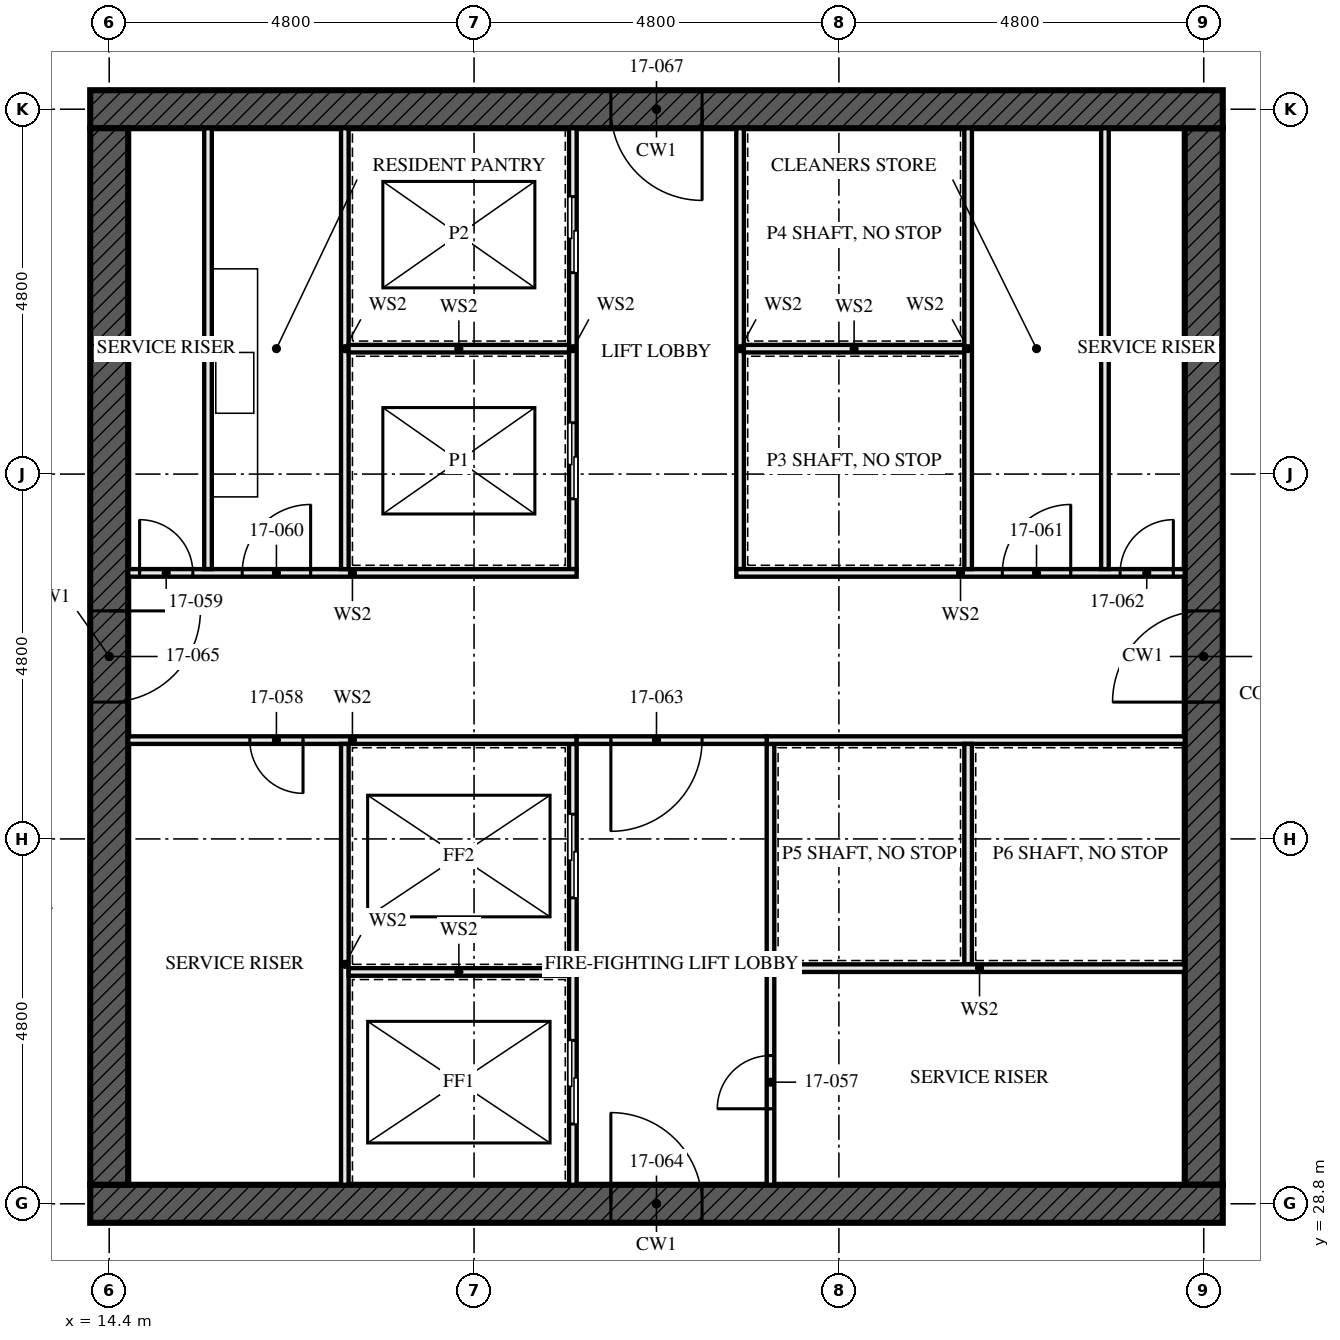
"""IFC4 building model, lengths in metres.
Left out: names, types, materials, properties, quantities, classifications, styles, units other than length and angle.
Written with IfcOpenShell. Run it as: python <this file> out.ifc"""

import sys

from ifc_helpers import new_model, si_unit, direction, frame, frame_2d, origin, place, context, subcontext, project, spatial, rectangle, extrude, element, fill, save


model = new_model("IFC4")
c1 = context("Model", 3, precision=1e-05, world=origin(), true_north=direction((0.0, 1.0)))
c2 = subcontext(c1, "Body", "Model", "MODEL_VIEW")
j1 = project(units=[si_unit("LENGTHUNIT", "METRE"), si_unit("PLANEANGLEUNIT", "RADIAN")], contexts=[c1])
p1 = place(None, origin())
s1 = spatial("IfcSite", under=j1, at=p1, CompositionType="ELEMENT")
p2 = place(p1, origin())
s2 = spatial("IfcBuilding", under=s1, at=p2, CompositionType="ELEMENT")
p3 = place(p2, frame((0.0, 0.0, 65.5)))
s3 = spatial("IfcBuildingStorey", under=s2, at=p3, CompositionType="ELEMENT", Elevation=65.5)
p4 = place(p3, frame((14.15, 28.8, -0.17), z_axis=(0.0, 0.0, 1.0), x_axis=(1.0, 0.0, 0.0)))
e1 = element("IfcWall", 1, at=p4, inside=s3, PredefinedType="SHEAR", context=c2, shape_type="SweptSolid", body=[
    extrude(rectangle(XDim=14.9, YDim=0.5, at=frame_2d((7.45, 0.0))), origin(), (0.0, 0.0, 1.0), 3.5),
])
p5 = place(p4, frame((6.85, 0.0, 0.17)))
e2 = element("IfcOpeningElement", 2, at=p5, cuts=e1, PredefinedType="OPENING", context=c2, shape_type="SweptSolid", body=[
    extrude(rectangle(XDim=1.2, YDim=2.1, at=frame_2d((0.6, 1.05))), frame((0.0, 0.26, 0.0), z_axis=(0.0, -1.0, 0.0), x_axis=(1.0, 0.0, 0.0)), (0.0, 0.0, 1.0), 0.521),
])
p6 = place(p3, frame((29.05, 43.2, -0.17), z_axis=(0.0, 0.0, 1.0), x_axis=(-1.0, 0.0, 0.0)))
e3 = element("IfcWall", 3, at=p6, inside=s3, PredefinedType="SHEAR", context=c2, shape_type="SweptSolid", body=[
    extrude(rectangle(XDim=14.9, YDim=0.5, at=frame_2d((7.45, 0.0))), origin(), (0.0, 0.0, 1.0), 3.5),
])
p7 = place(p6, frame((6.85, 0.0, 0.17)))
e4 = element("IfcOpeningElement", 4, at=p7, cuts=e3, PredefinedType="OPENING", context=c2, shape_type="SweptSolid", body=[
    extrude(rectangle(XDim=1.2, YDim=2.1, at=frame_2d((0.6, 1.05))), frame((0.0, 0.26, 0.0), z_axis=(0.0, -1.0, 0.0), x_axis=(1.0, 0.0, 0.0)), (0.0, 0.0, 1.0), 0.521),
])
p8 = place(p3, frame((14.4, 42.95, -0.17), z_axis=(0.0, 0.0, 1.0), x_axis=(0.0, -1.0, 0.0)))
e5 = element("IfcWall", 5, at=p8, inside=s3, PredefinedType="SHEAR", context=c2, shape_type="SweptSolid", body=[
    extrude(rectangle(XDim=13.9, YDim=0.5, at=frame_2d((6.95, 0.0))), origin(), (0.0, 0.0, 1.0), 3.5),
])
p9 = place(p8, frame((6.35, 0.0, 0.17)))
e6 = element("IfcOpeningElement", 6, at=p9, cuts=e5, PredefinedType="OPENING", context=c2, shape_type="SweptSolid", body=[
    extrude(rectangle(XDim=1.2, YDim=2.1, at=frame_2d((0.6, 1.05))), frame((0.0, 0.26, 0.0), z_axis=(0.0, -1.0, 0.0), x_axis=(1.0, 0.0, 0.0)), (0.0, 0.0, 1.0), 0.521),
])
p10 = place(p3, frame((28.8, 29.05, -0.17), z_axis=(0.0, 0.0, 1.0), x_axis=(0.0, 1.0, 0.0)))
e7 = element("IfcWall", 7, at=p10, inside=s3, PredefinedType="SHEAR", context=c2, shape_type="SweptSolid", body=[
    extrude(rectangle(XDim=13.9, YDim=0.5, at=frame_2d((6.95, 0.0))), origin(), (0.0, 0.0, 1.0), 3.5),
])
p11 = place(p10, frame((6.35, 0.0, 0.17)))
e8 = element("IfcOpeningElement", 8, at=p11, cuts=e7, PredefinedType="OPENING", context=c2, shape_type="SweptSolid", body=[
    extrude(rectangle(XDim=1.2, YDim=2.1, at=frame_2d((0.6, 1.05))), frame((0.0, 0.26, 0.0), z_axis=(0.0, -1.0, 0.0), x_axis=(1.0, 0.0, 0.0)), (0.0, 0.0, 1.0), 0.521),
])
for number, where, z_axis, x_axis in (
    (9, (15.7, 37.15, 0.0), (0.0, 0.0, 1.0), (0.0, 1.0, 0.0)),
    (10, (27.5, 37.15, 0.0), (0.0, 0.0, 1.0), (0.0, 1.0, 0.0)),
):
    element("IfcWall", number, at=place(p3, frame(where, z_axis=z_axis, x_axis=x_axis)), inside=s3, PredefinedType="SOLIDWALL", context=c2, shape_type="SweptSolid", body=[
        extrude(rectangle(XDim=5.8, YDim=0.1, at=frame_2d((2.9, 0.0))), origin(), (0.0, 0.0, 1.0), 3.33),
    ])
p12 = place(p3, frame((20.5, 29.05, 0.0), z_axis=(0.0, 0.0, 1.0), x_axis=(0.0, 1.0, 0.0)))
e11 = element("IfcWall", 11, at=p12, inside=s3, PredefinedType="SOLIDWALL", context=c2, shape_type="SweptSolid", body=[
    extrude(rectangle(XDim=5.8, YDim=0.1, at=frame_2d((2.9, 0.0))), origin(), (0.0, 0.0, 1.0), 3.33),
])
p13 = place(p12, frame((0.8, 0.0, 0.0)))
e12 = element("IfcOpeningElement", 12, at=p13, cuts=e11, PredefinedType="OPENING", context=c2, shape_type="SweptSolid", body=[
    extrude(rectangle(XDim=1.1, YDim=2.3, at=frame_2d((0.55, 1.15))), frame((0.0, 0.061, 0.0), z_axis=(0.0, -1.0, 0.0), x_axis=(1.0, 0.0, 0.0)), (0.0, 0.0, 1.0), 0.121),
])
p14 = place(p12, frame((3.775, 0.0, 0.0)))
e13 = element("IfcOpeningElement", 13, at=p14, cuts=e11, PredefinedType="OPENING", context=c2, shape_type="SweptSolid", body=[
    extrude(rectangle(XDim=1.1, YDim=2.3, at=frame_2d((0.55, 1.15))), frame((0.0, 0.061, 0.0), z_axis=(0.0, -1.0, 0.0), x_axis=(1.0, 0.0, 0.0)), (0.0, 0.0, 1.0), 0.121),
])
p15 = place(p3, frame((20.5, 37.15, 0.0), z_axis=(0.0, 0.0, 1.0), x_axis=(0.0, 1.0, 0.0)))
e14 = element("IfcWall", 14, at=p15, inside=s3, PredefinedType="SOLIDWALL", context=c2, shape_type="SweptSolid", body=[
    extrude(rectangle(XDim=5.8, YDim=0.1, at=frame_2d((2.9, 0.0))), origin(), (0.0, 0.0, 1.0), 3.33),
])
p16 = place(p15, frame((0.925, 0.0, 0.0)))
e15 = element("IfcOpeningElement", 15, at=p16, cuts=e14, PredefinedType="OPENING", context=c2, shape_type="SweptSolid", body=[
    extrude(rectangle(XDim=1.0, YDim=2.1, at=frame_2d((0.5, 1.05))), frame((0.0, 0.061, 0.0), z_axis=(0.0, -1.0, 0.0), x_axis=(1.0, 0.0, 0.0)), (0.0, 0.0, 1.0), 0.121),
])
p17 = place(p15, frame((3.9, 0.0, 0.0)))
e16 = element("IfcOpeningElement", 16, at=p17, cuts=e14, PredefinedType="OPENING", context=c2, shape_type="SweptSolid", body=[
    extrude(rectangle(XDim=1.0, YDim=2.1, at=frame_2d((0.5, 1.05))), frame((0.0, 0.061, 0.0), z_axis=(0.0, -1.0, 0.0), x_axis=(1.0, 0.0, 0.0)), (0.0, 0.0, 1.0), 0.121),
])
p18 = place(p3, frame((22.7, 37.15, 0.0), z_axis=(0.0, 0.0, 1.0), x_axis=(0.0, 1.0, 0.0)))
e17 = element("IfcWall", 17, at=p18, inside=s3, PredefinedType="SOLIDWALL", context=c2, shape_type="SweptSolid", body=[
    extrude(rectangle(XDim=5.8, YDim=0.1, at=frame_2d((2.9, 0.0))), origin(), (0.0, 0.0, 1.0), 3.33),
])
p19 = place(p3, frame((23.1, 29.05, 0.0), z_axis=(0.0, 0.0, 1.0), x_axis=(0.0, 1.0, 0.0)))
e18 = element("IfcWall", 18, at=p19, inside=s3, PredefinedType="SOLIDWALL", context=c2, shape_type="SweptSolid", body=[
    extrude(rectangle(XDim=5.8, YDim=0.1, at=frame_2d((2.9, 0.0))), origin(), (0.0, 0.0, 1.0), 3.33),
])
p20 = place(p19, frame((1.0, 0.0, 0.0)))
e19 = element("IfcOpeningElement", 19, at=p20, cuts=e18, PredefinedType="OPENING", context=c2, shape_type="SweptSolid", body=[
    extrude(rectangle(XDim=0.7, YDim=2.1, at=frame_2d((0.35, 1.05))), frame((0.0, 0.061, 0.0), z_axis=(0.0, -1.0, 0.0), x_axis=(1.0, 0.0, 0.0)), (0.0, 0.0, 1.0), 0.121),
])
p21 = place(p3, frame((14.65, 34.9, 0.0), z_axis=(0.0, 0.0, 1.0), x_axis=(1.0, 0.0, 0.0)))
e20 = element("IfcWall", 20, at=p21, inside=s3, PredefinedType="SOLIDWALL", context=c2, shape_type="SweptSolid", body=[
    extrude(rectangle(XDim=5.9, YDim=0.1, at=frame_2d((2.95, 0.0))), origin(), (0.0, 0.0, 1.0), 3.33),
])
p22 = place(p21, frame((1.6, 0.0, 0.0)))
e21 = element("IfcOpeningElement", 21, at=p22, cuts=e20, PredefinedType="OPENING", context=c2, shape_type="SweptSolid", body=[
    extrude(rectangle(XDim=0.7, YDim=2.1, at=frame_2d((0.35, 1.05))), frame((0.0, 0.061, 0.0), z_axis=(0.0, -1.0, 0.0), x_axis=(1.0, 0.0, 0.0)), (0.0, 0.0, 1.0), 0.121),
])
p23 = place(p3, frame((23.05, 34.9, 0.0), z_axis=(0.0, 0.0, 1.0), x_axis=(1.0, 0.0, 0.0)))
e22 = element("IfcWall", 22, at=p23, inside=s3, PredefinedType="SOLIDWALL", context=c2, shape_type="SweptSolid", body=[
    extrude(rectangle(XDim=5.5, YDim=0.1, at=frame_2d((2.75, 0.0))), origin(), (0.0, 0.0, 1.0), 3.33),
])
p24 = place(p3, frame((14.65, 37.1, 0.0), z_axis=(0.0, 0.0, 1.0), x_axis=(1.0, 0.0, 0.0)))
e23 = element("IfcWall", 23, at=p24, inside=s3, PredefinedType="SOLIDWALL", context=c2, shape_type="SweptSolid", body=[
    extrude(rectangle(XDim=5.9, YDim=0.1, at=frame_2d((2.95, 0.0))), origin(), (0.0, 0.0, 1.0), 3.33),
])
p25 = place(p24, frame((0.15, 0.0, 0.0)))
e24 = element("IfcOpeningElement", 24, at=p25, cuts=e23, PredefinedType="OPENING", context=c2, shape_type="SweptSolid", body=[
    extrude(rectangle(XDim=0.7, YDim=2.1, at=frame_2d((0.35, 1.05))), frame((0.0, 0.061, 0.0), z_axis=(0.0, -1.0, 0.0), x_axis=(1.0, 0.0, 0.0)), (0.0, 0.0, 1.0), 0.121),
])
p26 = place(p24, frame((1.5, 0.0, 0.0)))
e25 = element("IfcOpeningElement", 25, at=p26, cuts=e23, PredefinedType="OPENING", context=c2, shape_type="SweptSolid", body=[
    extrude(rectangle(XDim=0.9, YDim=2.1, at=frame_2d((0.45, 1.05))), frame((0.0, 0.061, 0.0), z_axis=(0.0, -1.0, 0.0), x_axis=(1.0, 0.0, 0.0)), (0.0, 0.0, 1.0), 0.121),
])
p27 = place(p3, frame((22.65, 37.1, 0.0), z_axis=(0.0, 0.0, 1.0), x_axis=(1.0, 0.0, 0.0)))
e26 = element("IfcWall", 26, at=p27, inside=s3, PredefinedType="SOLIDWALL", context=c2, shape_type="SweptSolid", body=[
    extrude(rectangle(XDim=5.9, YDim=0.1, at=frame_2d((2.95, 0.0))), origin(), (0.0, 0.0, 1.0), 3.33),
])
p28 = place(p27, frame((3.5, 0.0, 0.0)))
e27 = element("IfcOpeningElement", 27, at=p28, cuts=e26, PredefinedType="OPENING", context=c2, shape_type="SweptSolid", body=[
    extrude(rectangle(XDim=0.9, YDim=2.1, at=frame_2d((0.45, 1.05))), frame((0.0, 0.061, 0.0), z_axis=(0.0, -1.0, 0.0), x_axis=(1.0, 0.0, 0.0)), (0.0, 0.0, 1.0), 0.121),
])
p29 = place(p27, frame((5.05, 0.0, 0.0)))
e28 = element("IfcOpeningElement", 28, at=p29, cuts=e26, PredefinedType="OPENING", context=c2, shape_type="SweptSolid", body=[
    extrude(rectangle(XDim=0.7, YDim=2.1, at=frame_2d((0.35, 1.05))), frame((0.0, 0.061, 0.0), z_axis=(0.0, -1.0, 0.0), x_axis=(1.0, 0.0, 0.0)), (0.0, 0.0, 1.0), 0.121),
])
p30 = place(p3, frame((20.55, 34.9, 0.0), z_axis=(0.0, 0.0, 1.0), x_axis=(1.0, 0.0, 0.0)))
e29 = element("IfcWall", 29, at=p30, inside=s3, PredefinedType="SOLIDWALL", context=c2, shape_type="SweptSolid", body=[
    extrude(rectangle(XDim=2.5, YDim=0.1, at=frame_2d((1.25, 0.0))), origin(), (0.0, 0.0, 1.0), 3.33),
])
p31 = place(p30, frame((0.45, 0.0, 0.0)))
e30 = element("IfcOpeningElement", 30, at=p31, cuts=e29, PredefinedType="OPENING", context=c2, shape_type="SweptSolid", body=[
    extrude(rectangle(XDim=1.2, YDim=2.1, at=frame_2d((0.6, 1.05))), frame((0.0, 0.061, 0.0), z_axis=(0.0, -1.0, 0.0), x_axis=(1.0, 0.0, 0.0)), (0.0, 0.0, 1.0), 0.121),
])
p32 = place(p3, frame((17.5, 29.05, 0.0), z_axis=(0.0, 0.0, 1.0), x_axis=(0.0, 1.0, 0.0)))
e31 = element("IfcWall", 31, at=p32, inside=s3, PredefinedType="SOLIDWALL", context=c2, shape_type="SweptSolid", body=[
    extrude(rectangle(XDim=5.8, YDim=0.1, at=frame_2d((2.9, 0.0))), origin(), (0.0, 0.0, 1.0), 3.33),
])
p33 = place(p3, frame((17.55, 31.85, 0.0), z_axis=(0.0, 0.0, 1.0), x_axis=(1.0, 0.0, 0.0)))
e32 = element("IfcWall", 32, at=p33, inside=s3, PredefinedType="SOLIDWALL", context=c2, shape_type="SweptSolid", body=[
    extrude(rectangle(XDim=2.9, YDim=0.1, at=frame_2d((1.45, 0.0))), origin(), (0.0, 0.0, 1.0), 3.33),
])
p34 = place(p3, frame((17.5, 37.15, 0.0), z_axis=(0.0, 0.0, 1.0), x_axis=(0.0, 1.0, 0.0)))
e33 = element("IfcWall", 33, at=p34, inside=s3, PredefinedType="SOLIDWALL", context=c2, shape_type="SweptSolid", body=[
    extrude(rectangle(XDim=5.8, YDim=0.1, at=frame_2d((2.9, 0.0))), origin(), (0.0, 0.0, 1.0), 3.33),
])
for number, where, z_axis, x_axis in (
    (34, (17.55, 40.05, 0.0), (0.0, 0.0, 1.0), (1.0, 0.0, 0.0)),
    (35, (22.75, 40.05, 0.0), (0.0, 0.0, 1.0), (1.0, 0.0, 0.0)),
):
    element("IfcWall", number, at=place(p3, frame(where, z_axis=z_axis, x_axis=x_axis)), inside=s3, PredefinedType="SOLIDWALL", context=c2, shape_type="SweptSolid", body=[
        extrude(rectangle(XDim=2.9, YDim=0.1, at=frame_2d((1.45, 0.0))), origin(), (0.0, 0.0, 1.0), 3.33),
    ])
p35 = place(p3, frame((25.7, 37.15, 0.0), z_axis=(0.0, 0.0, 1.0), x_axis=(0.0, 1.0, 0.0)))
e36 = element("IfcWall", 36, at=p35, inside=s3, PredefinedType="SOLIDWALL", context=c2, shape_type="SweptSolid", body=[
    extrude(rectangle(XDim=5.8, YDim=0.1, at=frame_2d((2.9, 0.0))), origin(), (0.0, 0.0, 1.0), 3.33),
])
p36 = place(p3, frame((25.7, 31.95, 0.0), z_axis=(0.0, 0.0, 1.0), x_axis=(0.0, 1.0, 0.0)))
e37 = element("IfcWall", 37, at=p36, inside=s3, PredefinedType="SOLIDWALL", context=c2, shape_type="SweptSolid", body=[
    extrude(rectangle(XDim=2.9, YDim=0.1, at=frame_2d((1.45, 0.0))), origin(), (0.0, 0.0, 1.0), 3.33),
])
p37 = place(p3, frame((23.15, 31.9, 0.0), z_axis=(0.0, 0.0, 1.0), x_axis=(1.0, 0.0, 0.0)))
e38 = element("IfcWall", 38, at=p37, inside=s3, PredefinedType="SOLIDWALL", context=c2, shape_type="SweptSolid", body=[
    extrude(rectangle(XDim=5.4, YDim=0.1, at=frame_2d((2.7, 0.0))), origin(), (0.0, 0.0, 1.0), 3.33),
])
p38 = place(p13, origin())
e39 = element("IfcDoor", 39, at=p38, inside=s3, OperationType="SLIDING_TO_LEFT", PredefinedType="DOOR", context=c2, shape_type="SweptSolid", body=[
    extrude(rectangle(XDim=1.1, YDim=2.3, at=frame_2d((0.55, 1.15))), frame((0.0, 0.05, 0.0), z_axis=(0.0, -1.0, 0.0), x_axis=(1.0, 0.0, 0.0)), (0.0, 0.0, 1.0), 0.1),
])
fill(e12, e39)
p39 = place(p14, origin())
e40 = element("IfcDoor", 40, at=p39, inside=s3, OperationType="SLIDING_TO_LEFT", PredefinedType="DOOR", context=c2, shape_type="SweptSolid", body=[
    extrude(rectangle(XDim=1.1, YDim=2.3, at=frame_2d((0.55, 1.15))), frame((0.0, 0.05, 0.0), z_axis=(0.0, -1.0, 0.0), x_axis=(1.0, 0.0, 0.0)), (0.0, 0.0, 1.0), 0.1),
])
fill(e13, e40)
p40 = place(p16, origin())
e41 = element("IfcDoor", 41, at=p40, inside=s3, OperationType="SLIDING_TO_LEFT", PredefinedType="DOOR", context=c2, shape_type="SweptSolid", body=[
    extrude(rectangle(XDim=1.0, YDim=2.1, at=frame_2d((0.5, 1.05))), frame((0.0, 0.05, 0.0), z_axis=(0.0, -1.0, 0.0), x_axis=(1.0, 0.0, 0.0)), (0.0, 0.0, 1.0), 0.1),
])
fill(e15, e41)
p41 = place(p17, origin())
e42 = element("IfcDoor", 42, at=p41, inside=s3, OperationType="SLIDING_TO_LEFT", PredefinedType="DOOR", context=c2, shape_type="SweptSolid", body=[
    extrude(rectangle(XDim=1.0, YDim=2.1, at=frame_2d((0.5, 1.05))), frame((0.0, 0.05, 0.0), z_axis=(0.0, -1.0, 0.0), x_axis=(1.0, 0.0, 0.0)), (0.0, 0.0, 1.0), 0.1),
])
fill(e16, e42)
p42 = place(p20, origin())
e43 = element("IfcDoor", 43, at=p42, inside=s3, OperationType="SINGLE_SWING_RIGHT", PredefinedType="DOOR", context=c2, shape_type="SweptSolid", body=[
    extrude(rectangle(XDim=0.7, YDim=2.1, at=frame_2d((0.35, 1.05))), frame((0.0, 0.027, 0.0), z_axis=(0.0, -1.0, 0.0), x_axis=(1.0, 0.0, 0.0)), (0.0, 0.0, 1.0), 0.054),
])
fill(e19, e43)
p43 = place(p22, frame((0.7, 0.0, 0.0), z_axis=(0.0, 0.0, 1.0), x_axis=(-1.0, 0.0, 0.0)))
e44 = element("IfcDoor", 44, at=p43, inside=s3, OperationType="SINGLE_SWING_RIGHT", PredefinedType="DOOR", context=c2, shape_type="SweptSolid", body=[
    extrude(rectangle(XDim=0.7, YDim=2.1, at=frame_2d((0.35, 1.05))), frame((0.0, 0.027, 0.0), z_axis=(0.0, -1.0, 0.0), x_axis=(1.0, 0.0, 0.0)), (0.0, 0.0, 1.0), 0.054),
])
fill(e21, e44)
p44 = place(p25, origin())
e45 = element("IfcDoor", 45, at=p44, inside=s3, OperationType="SINGLE_SWING_RIGHT", PredefinedType="DOOR", context=c2, shape_type="SweptSolid", body=[
    extrude(rectangle(XDim=0.7, YDim=2.1, at=frame_2d((0.35, 1.05))), frame((0.0, 0.027, 0.0), z_axis=(0.0, -1.0, 0.0), x_axis=(1.0, 0.0, 0.0)), (0.0, 0.0, 1.0), 0.054),
])
fill(e24, e45)
p45 = place(p26, origin())
e46 = element("IfcDoor", 46, at=p45, inside=s3, OperationType="SINGLE_SWING_LEFT", PredefinedType="DOOR", context=c2, shape_type="SweptSolid", body=[
    extrude(rectangle(XDim=0.9, YDim=2.1, at=frame_2d((0.45, 1.05))), frame((0.0, 0.027, 0.0), z_axis=(0.0, -1.0, 0.0), x_axis=(1.0, 0.0, 0.0)), (0.0, 0.0, 1.0), 0.054),
])
fill(e25, e46)
p46 = place(p28, origin())
e47 = element("IfcDoor", 47, at=p46, inside=s3, OperationType="SINGLE_SWING_LEFT", PredefinedType="DOOR", context=c2, shape_type="SweptSolid", body=[
    extrude(rectangle(XDim=0.9, YDim=2.1, at=frame_2d((0.45, 1.05))), frame((0.0, 0.027, 0.0), z_axis=(0.0, -1.0, 0.0), x_axis=(1.0, 0.0, 0.0)), (0.0, 0.0, 1.0), 0.054),
])
fill(e27, e47)
p47 = place(p29, origin())
e48 = element("IfcDoor", 48, at=p47, inside=s3, OperationType="SINGLE_SWING_LEFT", PredefinedType="DOOR", context=c2, shape_type="SweptSolid", body=[
    extrude(rectangle(XDim=0.7, YDim=2.1, at=frame_2d((0.35, 1.05))), frame((0.0, 0.027, 0.0), z_axis=(0.0, -1.0, 0.0), x_axis=(1.0, 0.0, 0.0)), (0.0, 0.0, 1.0), 0.054),
])
fill(e28, e48)
p48 = place(p31, frame((1.2, 0.0, 0.0), z_axis=(0.0, 0.0, 1.0), x_axis=(-1.0, 0.0, 0.0)))
e49 = element("IfcDoor", 49, at=p48, inside=s3, OperationType="SINGLE_SWING_LEFT", PredefinedType="DOOR", context=c2, shape_type="SweptSolid", body=[
    extrude(rectangle(XDim=1.2, YDim=2.1, at=frame_2d((0.6, 1.05))), frame((0.0, 0.027, 0.0), z_axis=(0.0, -1.0, 0.0), x_axis=(1.0, 0.0, 0.0)), (0.0, 0.0, 1.0), 0.054),
])
fill(e30, e49)
p49 = place(p5, origin())
e50 = element("IfcDoor", 50, at=p49, inside=s3, OperationType="SINGLE_SWING_LEFT", PredefinedType="DOOR", context=c2, shape_type="SweptSolid", body=[
    extrude(rectangle(XDim=1.2, YDim=2.1, at=frame_2d((0.6, 1.05))), frame((0.0, 0.027, 0.0), z_axis=(0.0, -1.0, 0.0), x_axis=(1.0, 0.0, 0.0)), (0.0, 0.0, 1.0), 0.054),
])
fill(e2, e50)
p50 = place(p9, origin())
e51 = element("IfcDoor", 51, at=p50, inside=s3, OperationType="SINGLE_SWING_LEFT", PredefinedType="DOOR", context=c2, shape_type="SweptSolid", body=[
    extrude(rectangle(XDim=1.2, YDim=2.1, at=frame_2d((0.6, 1.05))), frame((0.0, 0.027, 0.0), z_axis=(0.0, -1.0, 0.0), x_axis=(1.0, 0.0, 0.0)), (0.0, 0.0, 1.0), 0.054),
])
fill(e6, e51)
p51 = place(p11, origin())
e52 = element("IfcDoor", 52, at=p51, inside=s3, OperationType="SINGLE_SWING_LEFT", PredefinedType="DOOR", context=c2, shape_type="SweptSolid", body=[
    extrude(rectangle(XDim=1.2, YDim=2.1, at=frame_2d((0.6, 1.05))), frame((0.0, 0.027, 0.0), z_axis=(0.0, -1.0, 0.0), x_axis=(1.0, 0.0, 0.0)), (0.0, 0.0, 1.0), 0.054),
])
fill(e8, e52)
p52 = place(p7, origin())
e53 = element("IfcDoor", 53, at=p52, inside=s3, OperationType="SINGLE_SWING_LEFT", PredefinedType="DOOR", context=c2, shape_type="SweptSolid", body=[
    extrude(rectangle(XDim=1.2, YDim=2.1, at=frame_2d((0.6, 1.05))), frame((0.0, 0.027, 0.0), z_axis=(0.0, -1.0, 0.0), x_axis=(1.0, 0.0, 0.0)), (0.0, 0.0, 1.0), 0.054),
])
fill(e4, e53)
save(model, sys.argv[1])
